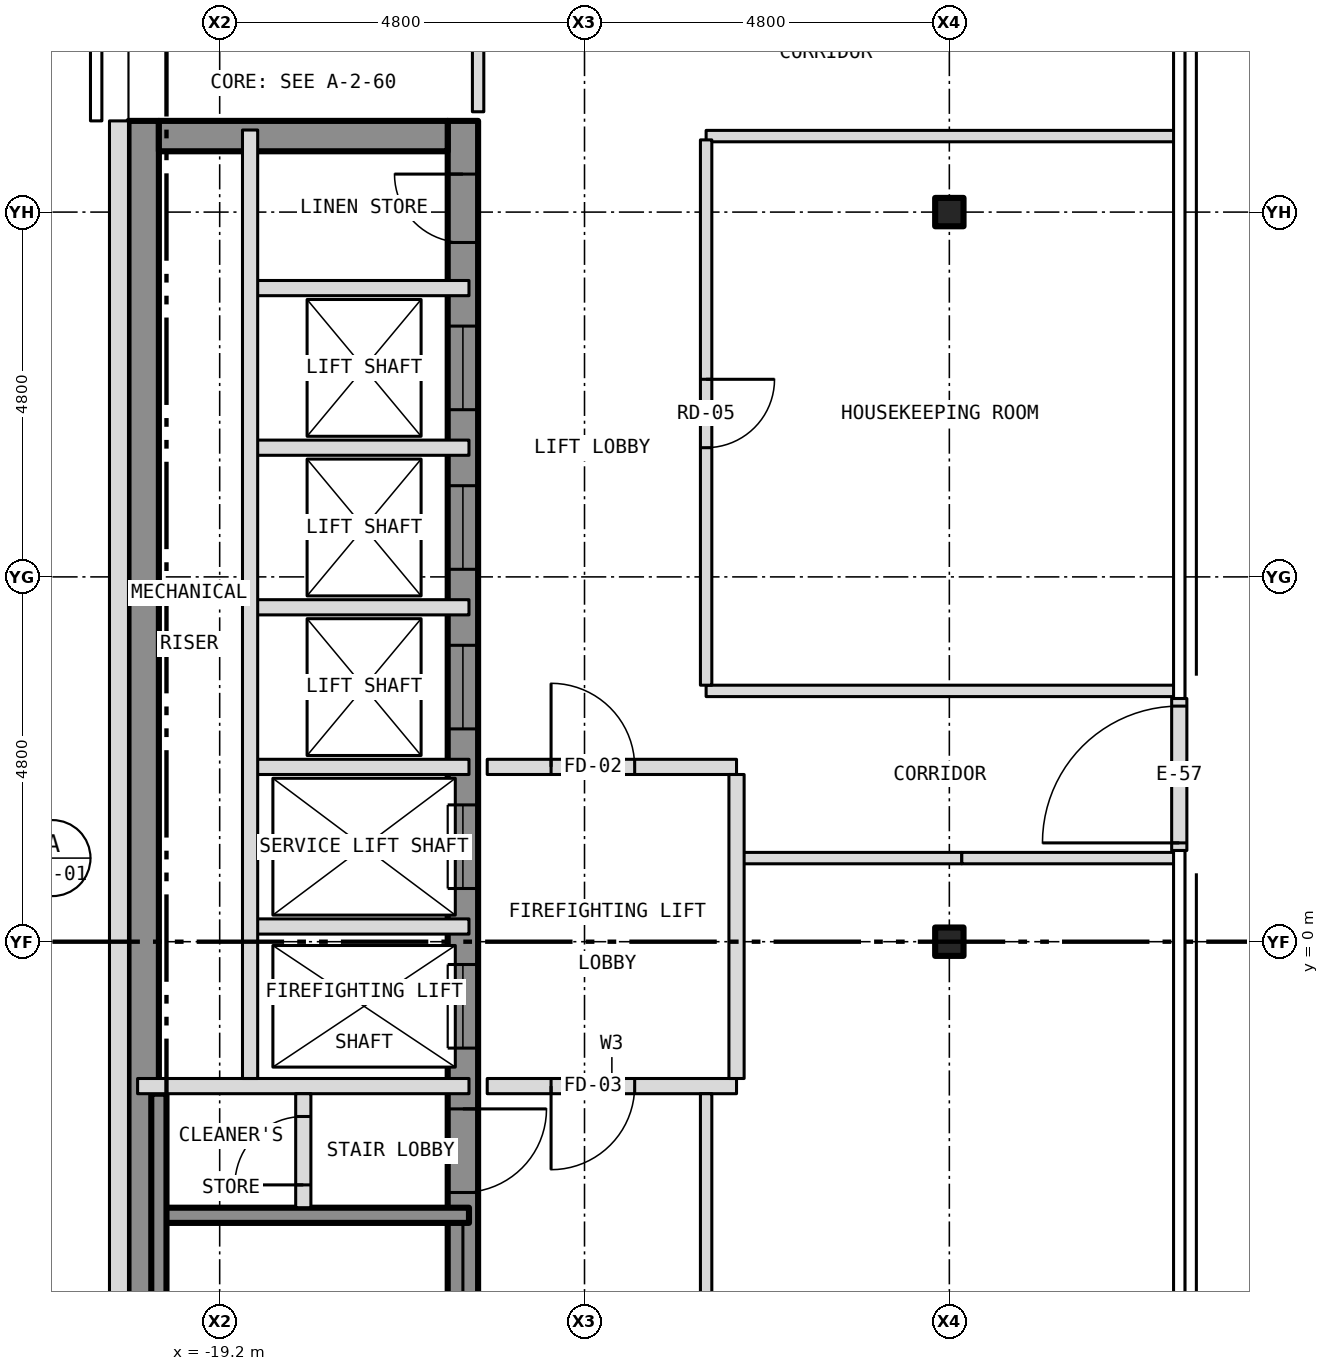
"""IFC4 building model, lengths in metres.
Left out: names, types, materials, properties, quantities, classifications, styles, units other than length and angle.
Written with IfcOpenShell. Run it as: python <this file> out.ifc"""

import sys

from ifc_helpers import new_model, si_unit, direction, frame, frame_2d, origin, origin_2d, place, context, subcontext, project, spatial, rectangle, i_section, extrude, element, fill, save


model = new_model("IFC4")
c1 = context("Model", 3, precision=1e-05, world=origin(), true_north=direction((0.0, 1.0)))
c2 = subcontext(c1, "Body", "Model", "MODEL_VIEW")
j1 = project(units=[si_unit("LENGTHUNIT", "METRE"), si_unit("PLANEANGLEUNIT", "RADIAN")], contexts=[c1])
p1 = place(None, origin())
s1 = spatial("IfcSite", under=j1, at=p1, CompositionType="ELEMENT")
p2 = place(p1, origin())
s2 = spatial("IfcBuilding", under=s1, at=p2, CompositionType="ELEMENT")
p3 = place(p2, frame((0.0, 0.0, 219.0)))
s3 = spatial("IfcBuildingStorey", under=s2, at=p3, CompositionType="ELEMENT", Elevation=219.0)
for number, where, z_axis, x_axis in (
    (1, (-9.6, 0.0, -0.15), (0.0, 0.0, 1.0), (1.0, 0.0, 0.0)),
    (2, (-9.6, 9.6, -0.15), (0.0, 0.0, 1.0), (1.0, 0.0, 0.0)),
):
    element("IfcColumn", number, at=place(p3, frame(where, z_axis=z_axis, x_axis=x_axis)), inside=s3, PredefinedType="COLUMN", context=c2, shape_type="SweptSolid", body=[
        extrude(i_section(OverallWidth=0.373, OverallDepth=0.373, WebThickness=0.016, FlangeThickness=0.026, at=origin_2d()), origin(), (0.0, 0.0, 1.0), 3.5),
    ])
p4 = place(p3, frame((-16.0, -10.8, 0.0), z_axis=(0.0, 0.0, 1.0), x_axis=(0.0, 1.0, 0.0)))
e3 = element("IfcWall", 3, at=p4, inside=s3, PredefinedType="SHEAR", context=c2, shape_type="SweptSolid", body=[
    extrude(rectangle(XDim=21.6, YDim=0.4, at=frame_2d((10.8, 0.0))), origin(), (0.0, 0.0, 1.0), 3.25),
])
p5 = place(p4, frame((9.4, 0.0, 0.0)))
e4 = element("IfcOpeningElement", 4, at=p5, cuts=e3, PredefinedType="OPENING", context=c2, shape_type="SweptSolid", body=[
    extrude(rectangle(XDim=1.1, YDim=2.1, at=frame_2d((0.55, 1.05))), frame((0.0, 0.212, 0.0), z_axis=(0.0, -1.0, 0.0), x_axis=(1.0, 0.0, 0.0)), (0.0, 0.0, 1.0), 0.424),
])
p6 = place(p4, frame((11.5, 0.0, 0.0)))
e5 = element("IfcOpeningElement", 5, at=p6, cuts=e3, PredefinedType="OPENING", context=c2, shape_type="SweptSolid", body=[
    extrude(rectangle(XDim=1.1, YDim=2.1, at=frame_2d((0.55, 1.05))), frame((0.0, 0.212, 0.0), z_axis=(0.0, -1.0, 0.0), x_axis=(1.0, 0.0, 0.0)), (0.0, 0.0, 1.0), 0.424),
])
p7 = place(p4, frame((13.6, 0.0, 0.0)))
e6 = element("IfcOpeningElement", 6, at=p7, cuts=e3, PredefinedType="OPENING", context=c2, shape_type="SweptSolid", body=[
    extrude(rectangle(XDim=1.1, YDim=2.1, at=frame_2d((0.55, 1.05))), frame((0.0, 0.212, 0.0), z_axis=(0.0, -1.0, 0.0), x_axis=(1.0, 0.0, 0.0)), (0.0, 0.0, 1.0), 0.424),
])
p8 = place(p4, frame((15.7, 0.0, 0.0)))
e7 = element("IfcOpeningElement", 7, at=p8, cuts=e3, PredefinedType="OPENING", context=c2, shape_type="SweptSolid", body=[
    extrude(rectangle(XDim=1.1, YDim=2.1, at=frame_2d((0.55, 1.05))), frame((0.0, 0.212, 0.0), z_axis=(0.0, -1.0, 0.0), x_axis=(1.0, 0.0, 0.0)), (0.0, 0.0, 1.0), 0.424),
])
p9 = place(p4, frame((17.8, 0.0, 0.0)))
e8 = element("IfcOpeningElement", 8, at=p9, cuts=e3, PredefinedType="OPENING", context=c2, shape_type="SweptSolid", body=[
    extrude(rectangle(XDim=1.1, YDim=2.1, at=frame_2d((0.55, 1.05))), frame((0.0, 0.212, 0.0), z_axis=(0.0, -1.0, 0.0), x_axis=(1.0, 0.0, 0.0)), (0.0, 0.0, 1.0), 0.424),
])
p10 = place(p4, frame((0.458, 0.0, 0.0)))
e9 = element("IfcOpeningElement", 9, at=p10, cuts=e3, PredefinedType="OPENING", context=c2, shape_type="SweptSolid", body=[
    extrude(rectangle(XDim=1.1, YDim=2.1, at=frame_2d((0.55, 1.05))), frame((0.0, 0.212, 0.0), z_axis=(0.0, -1.0, 0.0), x_axis=(1.0, 0.0, 0.0)), (0.0, 0.0, 1.0), 0.424),
])
p11 = place(p4, frame((7.5, 0.0, 0.0)))
e10 = element("IfcOpeningElement", 10, at=p11, cuts=e3, PredefinedType="OPENING", context=c2, shape_type="SweptSolid", body=[
    extrude(rectangle(XDim=1.1, YDim=2.1, at=frame_2d((0.55, 1.05))), frame((0.0, 0.212, 0.0), z_axis=(0.0, -1.0, 0.0), x_axis=(1.0, 0.0, 0.0)), (0.0, 0.0, 1.0), 0.424),
])
p12 = place(p4, frame((20.0, 0.0, 0.0)))
e11 = element("IfcOpeningElement", 11, at=p12, cuts=e3, PredefinedType="OPENING", context=c2, shape_type="SweptSolid", body=[
    extrude(rectangle(XDim=0.9, YDim=2.1, at=frame_2d((0.45, 1.05))), frame((0.0, 0.212, 0.0), z_axis=(0.0, -1.0, 0.0), x_axis=(1.0, 0.0, 0.0)), (0.0, 0.0, 1.0), 0.424),
])
p13 = place(p3, frame((-20.2, -10.8, 0.0), z_axis=(0.0, 0.0, 1.0), x_axis=(0.0, 1.0, 0.0)))
e12 = element("IfcWall", 12, at=p13, inside=s3, PredefinedType="SHEAR", context=c2, shape_type="SweptSolid", body=[
    extrude(rectangle(XDim=21.6, YDim=0.4, at=frame_2d((10.8, 0.0))), origin(), (0.0, 0.0, 1.0), 3.25),
])
p14 = place(p3, frame((-20.0, 10.6, 0.0), z_axis=(0.0, 0.0, 1.0), x_axis=(1.0, 0.0, 0.0)))
e13 = element("IfcWall", 13, at=p14, inside=s3, PredefinedType="SHEAR", context=c2, shape_type="SweptSolid", body=[
    extrude(rectangle(XDim=3.8, YDim=0.4, at=frame_2d((1.9, 0.0))), origin(), (0.0, 0.0, 1.0), 3.25),
])
p15 = place(p3, frame((-20.525, 10.8, 0.0), z_axis=(0.0, 0.0, 1.0), x_axis=(0.0, -1.0, 0.0)))
e14 = element("IfcWall", 14, at=p15, inside=s3, PredefinedType="SOLIDWALL", context=c2, shape_type="SweptSolid", body=[
    extrude(rectangle(XDim=21.6, YDim=0.25, at=frame_2d((10.8, 0.0))), origin(), (0.0, 0.0, 1.0), 3.5),
])
p16 = place(p15, frame((18.05, 0.0, 1.0)))
e15 = element("IfcOpeningElement", 15, at=p16, cuts=e14, PredefinedType="OPENING", context=c2, shape_type="SweptSolid", body=[
    extrude(rectangle(XDim=0.6, YDim=1.5, at=frame_2d((0.3, 0.75))), frame((0.0, 0.137, 0.0), z_axis=(0.0, -1.0, 0.0), x_axis=(1.0, 0.0, 0.0)), (0.0, 0.0, 1.0), 0.274),
])
p17 = place(p3, frame((-6.575, 1.2, 0.0), z_axis=(0.0, 0.0, 1.0), x_axis=(0.0, 1.0, 0.0)))
e16 = element("IfcWall", 16, at=p17, inside=s3, PredefinedType="SOLIDWALL", context=c2, shape_type="SweptSolid", body=[
    extrude(rectangle(XDim=2.0, YDim=0.2, at=frame_2d((1.0, 0.0))), origin(), (0.0, 0.0, 1.0), 2.593),
])
p18 = place(p17, frame((0.1, 0.0, 0.0)))
e17 = element("IfcOpeningElement", 17, at=p18, cuts=e16, PredefinedType="OPENING", context=c2, shape_type="SweptSolid", body=[
    extrude(rectangle(XDim=1.8, YDim=2.1, at=frame_2d((0.9, 1.05))), frame((0.0, 0.112, 0.0), z_axis=(0.0, -1.0, 0.0), x_axis=(1.0, 0.0, 0.0)), (0.0, 0.0, 1.0), 0.224),
])
p19 = place(p3, frame((-20.0, -3.6, 0.0), z_axis=(0.0, 0.0, 1.0), x_axis=(1.0, 0.0, 0.0)))
e18 = element("IfcWall", 18, at=p19, inside=s3, PredefinedType="SHEAR", context=c2, shape_type="SweptSolid", body=[
    extrude(rectangle(XDim=4.08, YDim=0.2, at=frame_2d((2.04, 0.0))), origin(), (0.0, 0.0, 1.0), 3.25),
])
p20 = place(p3, frame((-20.28, -1.9, 0.0), z_axis=(0.0, 0.0, 1.0), x_axis=(1.0, 0.0, 0.0)))
e19 = element("IfcWall", 19, at=p20, inside=s3, PredefinedType="PARTITIONING", context=c2, shape_type="SweptSolid", body=[
    extrude(rectangle(XDim=4.36, YDim=0.2, at=frame_2d((2.18, 0.0))), origin(), (0.0, 0.0, 1.0), 3.25),
])
p21 = place(p3, frame((-15.68, -1.9, 0.0), z_axis=(0.0, 0.0, 1.0), x_axis=(1.0, 0.0, 0.0)))
e20 = element("IfcWall", 20, at=p21, inside=s3, PredefinedType="PARTITIONING", context=c2, shape_type="SweptSolid", body=[
    extrude(rectangle(XDim=3.28, YDim=0.2, at=frame_2d((1.64, 0.0))), origin(), (0.0, 0.0, 1.0), 3.35),
])
p22 = place(p21, frame((0.84, 0.0, 0.0)))
e21 = element("IfcOpeningElement", 21, at=p22, cuts=e20, PredefinedType="OPENING", context=c2, shape_type="SweptSolid", body=[
    extrude(rectangle(XDim=1.1, YDim=2.1, at=frame_2d((0.55, 1.05))), frame((0.0, 0.112, 0.0), z_axis=(0.0, -1.0, 0.0), x_axis=(1.0, 0.0, 0.0)), (0.0, 0.0, 1.0), 0.224),
])
p23 = place(p3, frame((-18.8, 0.2, 0.0), z_axis=(0.0, 0.0, 1.0), x_axis=(1.0, 0.0, 0.0)))
e22 = element("IfcWall", 22, at=p23, inside=s3, PredefinedType="PARTITIONING", context=c2, shape_type="SweptSolid", body=[
    extrude(rectangle(XDim=2.88, YDim=0.2, at=frame_2d((1.44, 0.0))), origin(), (0.0, 0.0, 1.0), 3.25),
])
p24 = place(p3, frame((-12.4, 1.1, 0.0), z_axis=(0.0, 0.0, 1.0), x_axis=(1.0, 0.0, 0.0)))
e23 = element("IfcWall", 23, at=p24, inside=s3, PredefinedType="PARTITIONING", context=c2, shape_type="SweptSolid", body=[
    extrude(rectangle(XDim=2.964, YDim=0.15, at=frame_2d((1.482, 0.0))), origin(), (0.0, 0.0, 1.0), 3.35),
])
p25 = place(p3, frame((-9.436, 1.1, 0.0), z_axis=(0.0, 0.0, 1.0), x_axis=(1.0, 0.0, 0.0)))
e24 = element("IfcWall", 24, at=p25, inside=s3, PredefinedType="PARTITIONING", context=c2, shape_type="SweptSolid", body=[
    extrude(rectangle(XDim=2.816, YDim=0.15, at=frame_2d((1.408, 0.0))), origin(), (0.0, 0.0, 1.0), 2.593),
])
p26 = place(p3, frame((-18.8, 2.3, 0.0), z_axis=(0.0, 0.0, 1.0), x_axis=(1.0, 0.0, 0.0)))
e25 = element("IfcWall", 25, at=p26, inside=s3, PredefinedType="PARTITIONING", context=c2, shape_type="SweptSolid", body=[
    extrude(rectangle(XDim=2.88, YDim=0.2, at=frame_2d((1.44, 0.0))), origin(), (0.0, 0.0, 1.0), 3.25),
])
p27 = place(p3, frame((-15.68, 2.3, 0.0), z_axis=(0.0, 0.0, 1.0), x_axis=(1.0, 0.0, 0.0)))
e26 = element("IfcWall", 26, at=p27, inside=s3, PredefinedType="PARTITIONING", context=c2, shape_type="SweptSolid", body=[
    extrude(rectangle(XDim=3.28, YDim=0.2, at=frame_2d((1.64, 0.0))), origin(), (0.0, 0.0, 1.0), 3.35),
])
p28 = place(p27, frame((0.84, 0.0, 0.0)))
e27 = element("IfcOpeningElement", 27, at=p28, cuts=e26, PredefinedType="OPENING", context=c2, shape_type="SweptSolid", body=[
    extrude(rectangle(XDim=1.1, YDim=2.1, at=frame_2d((0.55, 1.05))), frame((0.0, 0.112, 0.0), z_axis=(0.0, -1.0, 0.0), x_axis=(1.0, 0.0, 0.0)), (0.0, 0.0, 1.0), 0.224),
])
p29 = place(p3, frame((-12.8, 3.3, 0.0), z_axis=(0.0, 0.0, 1.0), x_axis=(1.0, 0.0, 0.0)))
e28 = element("IfcWall", 28, at=p29, inside=s3, PredefinedType="PARTITIONING", context=c2, shape_type="SweptSolid", body=[
    extrude(rectangle(XDim=6.18, YDim=0.15, at=frame_2d((3.09, 0.0))), origin(), (0.0, 0.0, 1.0), 3.35),
])
for number, where, z_axis, x_axis in (
    (29, (-18.8, 4.4, 0.0), (0.0, 0.0, 1.0), (1.0, 0.0, 0.0)),
    (30, (-18.8, 6.5, 0.0), (0.0, 0.0, 1.0), (1.0, 0.0, 0.0)),
    (31, (-18.8, 8.6, 0.0), (0.0, 0.0, 1.0), (1.0, 0.0, 0.0)),
):
    element("IfcWall", number, at=place(p3, frame(where, z_axis=z_axis, x_axis=x_axis)), inside=s3, PredefinedType="PARTITIONING", context=c2, shape_type="SweptSolid", body=[
        extrude(rectangle(XDim=2.88, YDim=0.2, at=frame_2d((1.44, 0.0))), origin(), (0.0, 0.0, 1.0), 3.25),
    ])
p30 = place(p3, frame((-12.8, 10.6, 0.0), z_axis=(0.0, 0.0, 1.0), x_axis=(1.0, 0.0, 0.0)))
e32 = element("IfcWall", 32, at=p30, inside=s3, PredefinedType="PARTITIONING", context=c2, shape_type="SweptSolid", body=[
    extrude(rectangle(XDim=6.18, YDim=0.15, at=frame_2d((3.09, 0.0))), origin(), (0.0, 0.0, 1.0), 3.35),
])
p31 = place(p3, frame((-20.0, -10.68, 0.0), z_axis=(0.0, 0.0, 1.0), x_axis=(0.0, 1.0, 0.0)))
e33 = element("IfcWall", 33, at=p31, inside=s3, PredefinedType="SHEAR", context=c2, shape_type="SweptSolid", body=[
    extrude(rectangle(XDim=8.68, YDim=0.2, at=frame_2d((4.34, 0.0))), origin(), (0.0, 0.0, 1.0), 3.25),
])
p32 = place(p3, frame((-18.8, -1.8, 0.0), z_axis=(0.0, 0.0, 1.0), x_axis=(0.0, 1.0, 0.0)))
e34 = element("IfcWall", 34, at=p32, inside=s3, PredefinedType="PARTITIONING", context=c2, shape_type="SweptSolid", body=[
    extrude(rectangle(XDim=12.48, YDim=0.2, at=frame_2d((6.24, 0.0))), origin(), (0.0, 0.0, 1.0), 3.25),
])
p33 = place(p3, frame((-18.1, -3.5, 0.0), z_axis=(0.0, 0.0, 1.0), x_axis=(0.0, 1.0, 0.0)))
e35 = element("IfcWall", 35, at=p33, inside=s3, PredefinedType="PARTITIONING", context=c2, shape_type="SweptSolid", body=[
    extrude(rectangle(XDim=1.5, YDim=0.2, at=frame_2d((0.75, 0.0))), origin(), (0.0, 0.0, 1.0), 3.25),
])
p34 = place(p33, frame((0.3, 0.0, 0.0)))
e36 = element("IfcOpeningElement", 36, at=p34, cuts=e35, PredefinedType="OPENING", context=c2, shape_type="SweptSolid", body=[
    extrude(rectangle(XDim=0.9, YDim=2.1, at=frame_2d((0.45, 1.05))), frame((0.0, 0.112, 0.0), z_axis=(0.0, -1.0, 0.0), x_axis=(1.0, 0.0, 0.0)), (0.0, 0.0, 1.0), 0.224),
])
p35 = place(p3, frame((-15.8, 10.92, 0.0), z_axis=(0.0, 0.0, 1.0), x_axis=(0.0, 1.0, 0.0)))
e37 = element("IfcWall", 37, at=p35, inside=s3, PredefinedType="PARTITIONING", context=c2, shape_type="SweptSolid", body=[
    extrude(rectangle(XDim=1.805, YDim=0.15, at=frame_2d((0.903, 0.0))), origin(), (0.0, 0.0, 1.0), 3.35),
])
p36 = place(p3, frame((-12.8, -10.525, 0.0), z_axis=(0.0, 0.0, 1.0), x_axis=(0.0, 1.0, 0.0)))
e38 = element("IfcWall", 38, at=p36, inside=s3, PredefinedType="PARTITIONING", context=c2, shape_type="SweptSolid", body=[
    extrude(rectangle(XDim=8.525, YDim=0.15, at=frame_2d((4.262, 0.0))), origin(), (0.0, 0.0, 1.0), 3.35),
])
p37 = place(p36, frame((3.825, 0.0, 0.0)))
e39 = element("IfcOpeningElement", 39, at=p37, cuts=e38, PredefinedType="OPENING", context=c2, shape_type="SweptSolid", body=[
    extrude(rectangle(XDim=0.9, YDim=2.1, at=frame_2d((0.45, 1.05))), frame((0.0, 0.087, 0.0), z_axis=(0.0, -1.0, 0.0), x_axis=(1.0, 0.0, 0.0)), (0.0, 0.0, 1.0), 0.174),
])
p38 = place(p3, frame((-12.8, 3.375, 0.0), z_axis=(0.0, 0.0, 1.0), x_axis=(0.0, 1.0, 0.0)))
e40 = element("IfcWall", 40, at=p38, inside=s3, PredefinedType="PARTITIONING", context=c2, shape_type="SweptSolid", body=[
    extrude(rectangle(XDim=7.175, YDim=0.15, at=frame_2d((3.587, 0.0))), origin(), (0.0, 0.0, 1.0), 3.35),
])
p39 = place(p38, frame((3.125, 0.0, 0.0)))
e41 = element("IfcOpeningElement", 41, at=p39, cuts=e40, PredefinedType="OPENING", context=c2, shape_type="SweptSolid", body=[
    extrude(rectangle(XDim=0.9, YDim=2.1, at=frame_2d((0.45, 1.05))), frame((0.0, 0.087, 0.0), z_axis=(0.0, -1.0, 0.0), x_axis=(1.0, 0.0, 0.0)), (0.0, 0.0, 1.0), 0.174),
])
p40 = place(p3, frame((-12.4, -1.8, 0.0), z_axis=(0.0, 0.0, 1.0), x_axis=(0.0, 1.0, 0.0)))
e42 = element("IfcWall", 42, at=p40, inside=s3, PredefinedType="PARTITIONING", context=c2, shape_type="SweptSolid", body=[
    extrude(rectangle(XDim=4.0, YDim=0.2, at=frame_2d((2.0, 0.0))), origin(), (0.0, 0.0, 1.0), 3.35),
])
p41 = place(p18, origin())
e43 = element("IfcDoor", 43, at=p41, inside=s3, OperationType="DOUBLE_DOOR_DOUBLE_SWING", PredefinedType="DOOR", context=c2, shape_type="SweptSolid", body=[
    extrude(rectangle(XDim=1.8, YDim=2.1, at=frame_2d((0.9, 1.05))), frame((0.0, 0.025, 0.0), z_axis=(0.0, -1.0, 0.0), x_axis=(1.0, 0.0, 0.0)), (0.0, 0.0, 1.0), 0.05),
])
fill(e17, e43)
p42 = place(p5, origin())
e44 = element("IfcDoor", 44, at=p42, inside=s3, OperationType="SLIDING_TO_LEFT", PredefinedType="DOOR", context=c2, shape_type="SweptSolid", body=[
    extrude(rectangle(XDim=1.1, YDim=2.1, at=frame_2d((0.55, 1.05))), frame((0.0, 0.025, 0.0), z_axis=(0.0, -1.0, 0.0), x_axis=(1.0, 0.0, 0.0)), (0.0, 0.0, 1.0), 0.05),
])
fill(e4, e44)
p43 = place(p6, origin())
e45 = element("IfcDoor", 45, at=p43, inside=s3, OperationType="SLIDING_TO_LEFT", PredefinedType="DOOR", context=c2, shape_type="SweptSolid", body=[
    extrude(rectangle(XDim=1.1, YDim=2.1, at=frame_2d((0.55, 1.05))), frame((0.0, 0.025, 0.0), z_axis=(0.0, -1.0, 0.0), x_axis=(1.0, 0.0, 0.0)), (0.0, 0.0, 1.0), 0.05),
])
fill(e5, e45)
p44 = place(p7, origin())
e46 = element("IfcDoor", 46, at=p44, inside=s3, OperationType="SLIDING_TO_LEFT", PredefinedType="DOOR", context=c2, shape_type="SweptSolid", body=[
    extrude(rectangle(XDim=1.1, YDim=2.1, at=frame_2d((0.55, 1.05))), frame((0.0, 0.025, 0.0), z_axis=(0.0, -1.0, 0.0), x_axis=(1.0, 0.0, 0.0)), (0.0, 0.0, 1.0), 0.05),
])
fill(e6, e46)
p45 = place(p8, origin())
e47 = element("IfcDoor", 47, at=p45, inside=s3, OperationType="SLIDING_TO_LEFT", PredefinedType="DOOR", context=c2, shape_type="SweptSolid", body=[
    extrude(rectangle(XDim=1.1, YDim=2.1, at=frame_2d((0.55, 1.05))), frame((0.0, 0.025, 0.0), z_axis=(0.0, -1.0, 0.0), x_axis=(1.0, 0.0, 0.0)), (0.0, 0.0, 1.0), 0.05),
])
fill(e7, e47)
p46 = place(p9, origin())
e48 = element("IfcDoor", 48, at=p46, inside=s3, OperationType="SLIDING_TO_LEFT", PredefinedType="DOOR", context=c2, shape_type="SweptSolid", body=[
    extrude(rectangle(XDim=1.1, YDim=2.1, at=frame_2d((0.55, 1.05))), frame((0.0, 0.025, 0.0), z_axis=(0.0, -1.0, 0.0), x_axis=(1.0, 0.0, 0.0)), (0.0, 0.0, 1.0), 0.05),
])
fill(e8, e48)
p47 = place(p34, origin())
e49 = element("IfcDoor", 49, at=p47, inside=s3, OperationType="SINGLE_SWING_LEFT", PredefinedType="DOOR", context=c2, shape_type="SweptSolid", body=[
    extrude(rectangle(XDim=0.9, YDim=2.1, at=frame_2d((0.45, 1.05))), frame((0.0, 0.025, 0.0), z_axis=(0.0, -1.0, 0.0), x_axis=(1.0, 0.0, 0.0)), (0.0, 0.0, 1.0), 0.05),
])
fill(e36, e49)
p48 = place(p11, origin())
e50 = element("IfcDoor", 50, at=p48, inside=s3, OperationType="SINGLE_SWING_RIGHT", PredefinedType="DOOR", context=c2, shape_type="SweptSolid", body=[
    extrude(rectangle(XDim=1.1, YDim=2.1, at=frame_2d((0.55, 1.05))), frame((0.0, 0.025, 0.0), z_axis=(0.0, -1.0, 0.0), x_axis=(1.0, 0.0, 0.0)), (0.0, 0.0, 1.0), 0.05),
])
fill(e10, e50)
p49 = place(p12, origin())
e51 = element("IfcDoor", 51, at=p49, inside=s3, OperationType="SINGLE_SWING_RIGHT", PredefinedType="DOOR", context=c2, shape_type="SweptSolid", body=[
    extrude(rectangle(XDim=0.9, YDim=2.1, at=frame_2d((0.45, 1.05))), frame((0.0, 0.025, 0.0), z_axis=(0.0, -1.0, 0.0), x_axis=(1.0, 0.0, 0.0)), (0.0, 0.0, 1.0), 0.05),
])
fill(e11, e51)
p50 = place(p28, origin())
e52 = element("IfcDoor", 52, at=p50, inside=s3, OperationType="SINGLE_SWING_LEFT", PredefinedType="DOOR", context=c2, shape_type="SweptSolid", body=[
    extrude(rectangle(XDim=1.1, YDim=2.1, at=frame_2d((0.55, 1.05))), frame((0.0, 0.025, 0.0), z_axis=(0.0, -1.0, 0.0), x_axis=(1.0, 0.0, 0.0)), (0.0, 0.0, 1.0), 0.05),
])
fill(e27, e52)
p51 = place(p22, origin())
e53 = element("IfcDoor", 53, at=p51, inside=s3, OperationType="SINGLE_SWING_LEFT", PredefinedType="DOOR", context=c2, shape_type="SweptSolid", body=[
    extrude(rectangle(XDim=1.1, YDim=2.1, at=frame_2d((0.55, 1.05))), frame((0.0, 0.025, 0.0), z_axis=(0.0, -1.0, 0.0), x_axis=(1.0, 0.0, 0.0)), (0.0, 0.0, 1.0), 0.05),
])
fill(e21, e53)
p52 = place(p39, origin())
e54 = element("IfcDoor", 54, at=p52, inside=s3, OperationType="SINGLE_SWING_RIGHT", PredefinedType="DOOR", context=c2, shape_type="SweptSolid", body=[
    extrude(rectangle(XDim=0.9, YDim=2.1, at=frame_2d((0.45, 1.05))), frame((0.0, 0.025, 0.0), z_axis=(0.0, -1.0, 0.0), x_axis=(1.0, 0.0, 0.0)), (0.0, 0.0, 1.0), 0.05),
])
fill(e41, e54)
save(model, sys.argv[1])
